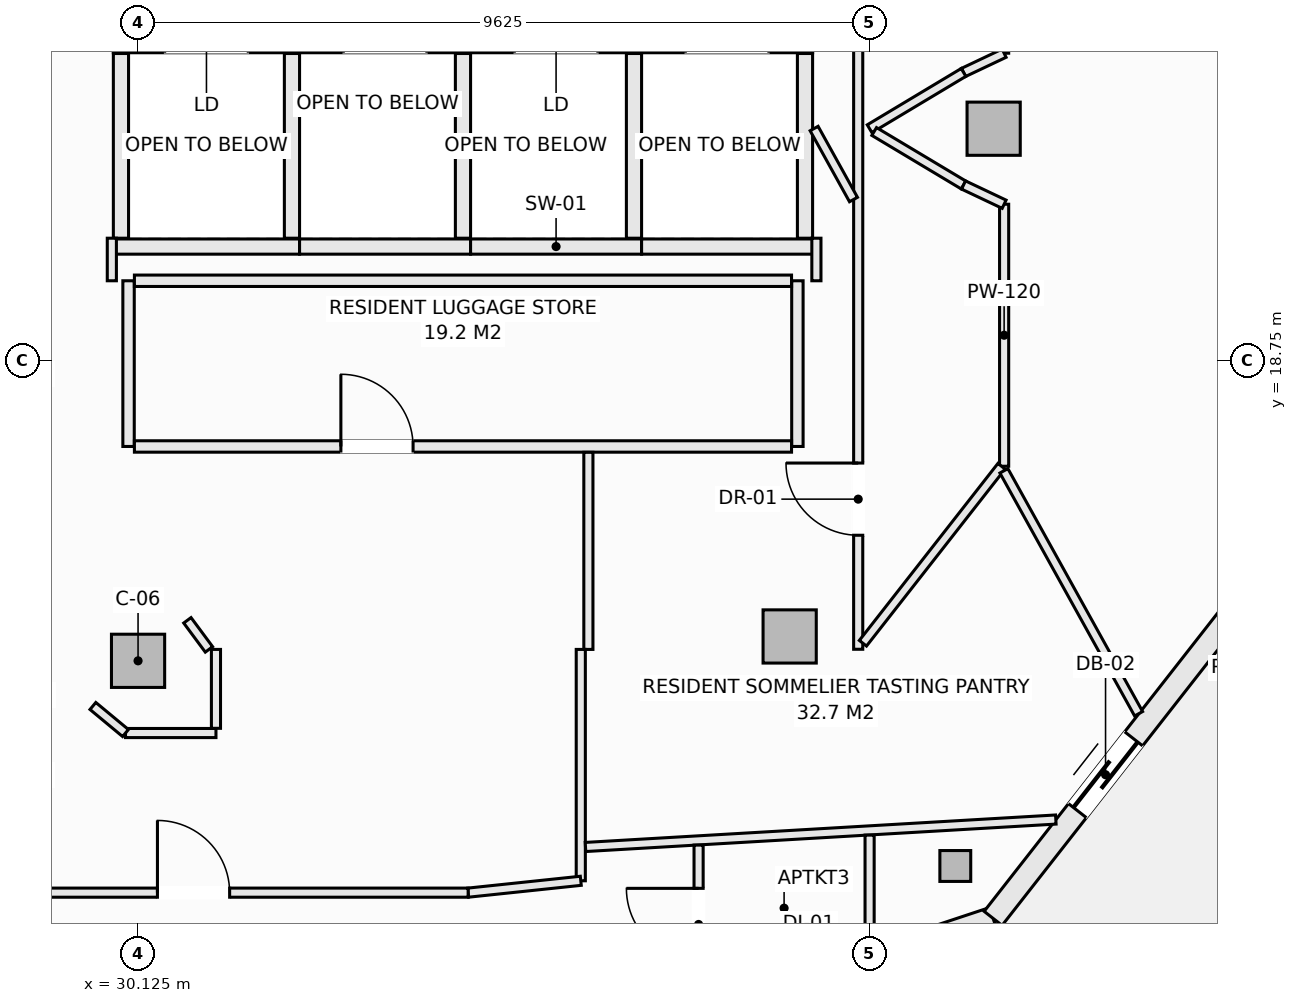
"""IFC4 building model, lengths in metres.
Left out: names, types, materials, properties, quantities, classifications, styles, units other than length and angle.
Written with IfcOpenShell. Run it as: python <this file> out.ifc"""

import sys

from ifc_helpers import new_model, si_unit, direction, frame, frame_2d, origin, origin_2d, place, context, subcontext, project, spatial, rectangle, hollow_rectangle, extrude, element, fill, save


model = new_model("IFC4")
c1 = context("Model", 3, precision=1e-05, world=origin(), true_north=direction((0.0, 1.0)))
c2 = subcontext(c1, "Body", "Model", "MODEL_VIEW")
j1 = project(units=[si_unit("LENGTHUNIT", "METRE"), si_unit("PLANEANGLEUNIT", "RADIAN")], contexts=[c1])
p1 = place(None, origin())
s1 = spatial("IfcSite", under=j1, at=p1, CompositionType="ELEMENT")
p2 = place(p1, origin())
s2 = spatial("IfcBuilding", under=s1, at=p2, CompositionType="ELEMENT")
p3 = place(p2, frame((0.0, 0.0, 245.9)))
s3 = spatial("IfcBuildingStorey", under=s2, at=p3, CompositionType="ELEMENT", Elevation=245.9)
p4 = place(p3, frame((40.878, 12.101, -0.27), z_axis=(0.0, 0.0, 1.0), x_axis=(1.0, 0.0, 0.0)))
e1 = element("IfcColumn", 1, at=p4, inside=s3, PredefinedType="COLUMN", context=c2, shape_type="SweptSolid", body=[
    extrude(hollow_rectangle(XDim=0.406, YDim=0.406, WallThickness=0.016, at=origin_2d()), origin(), (0.0, 0.0, 1.0), 3.3),
])
for number, where, z_axis, x_axis in (
    (2, (30.125, 14.8, -0.27), (0.0, 0.0, 1.0), (1.0, 0.0, 0.0)),
    (3, (38.698, 15.121, -0.27), (0.0, 0.0, 1.0), (1.0, 0.0, 0.0)),
    (4, (41.382, 21.801, -0.27), (0.0, 0.0, 1.0), (1.0, 0.0, 0.0)),
):
    element("IfcColumn", number, at=place(p3, frame(where, z_axis=z_axis, x_axis=x_axis)), inside=s3, PredefinedType="COLUMN", context=c2, shape_type="SweptSolid", body=[
        extrude(rectangle(XDim=0.7, YDim=0.7, at=origin_2d()), origin(), (0.0, 0.0, 1.0), 3.3),
    ])
p5 = place(p3, frame((35.948, 9.613, 0.0), z_axis=(0.0, 0.0, 1.0), x_axis=(0.949232769585, 0.314574552605, 0.0)))
e5 = element("IfcWall", 5, at=p5, inside=s3, PredefinedType="SOLIDWALL", context=c2, shape_type="SweptSolid", body=[
    extrude(rectangle(XDim=5.717, YDim=0.3, at=frame_2d((2.858, 0.0))), origin(), (0.0, 0.0, 1.0), 2.605),
])
p6 = place(p5, frame((2.64, 0.0, 0.72)))
e6 = element("IfcOpeningElement", 6, at=p6, cuts=e5, PredefinedType="OPENING", context=c2, shape_type="SweptSolid", body=[
    extrude(rectangle(XDim=1.2, YDim=1.65, at=frame_2d((0.6, 0.825))), frame((0.0, 0.16, 0.0), z_axis=(0.0, -1.0, 0.0), x_axis=(1.0, 0.0, 0.0)), (0.0, 0.0, 1.0), 0.32),
])
p7 = place(p3, frame((41.375, 11.412, 0.0), z_axis=(0.0, 0.0, 1.0), x_axis=(0.61644588519, 0.787397276241, 0.0)))
e7 = element("IfcWall", 7, at=p7, inside=s3, PredefinedType="SOLIDWALL", context=c2, shape_type="SweptSolid", body=[
    extrude(rectangle(XDim=5.357, YDim=0.3, at=frame_2d((2.678, 0.0))), origin(), (0.0, 0.0, 1.0), 2.605),
])
p8 = place(p7, frame((1.8, 0.0, 0.0)))
e8 = element("IfcOpeningElement", 8, at=p8, cuts=e7, PredefinedType="OPENING", context=c2, shape_type="SweptSolid", body=[
    extrude(rectangle(XDim=1.2, YDim=2.2, at=frame_2d((0.6, 1.1))), frame((0.0, 0.16, 0.0), z_axis=(0.0, -1.0, 0.0), x_axis=(1.0, 0.0, 0.0)), (0.0, 0.0, 1.0), 0.32),
])
p9 = place(p3, frame((43.323, 8.646, 0.0), z_axis=(0.0, 0.0, 1.0), x_axis=(0.63407318032, 0.77327304492, 0.0)))
e9 = element("IfcWall", 9, at=p9, inside=s3, PredefinedType="PARAPET", context=c2, shape_type="SweptSolid", body=[
    extrude(rectangle(XDim=6.379, YDim=0.22, at=frame_2d((3.189, 0.0))), origin(), (0.0, 0.0, 1.0), 0.52),
])
p10 = place(p3, frame((29.8, 22.9, 0.0), z_axis=(0.0, 0.0, 1.0), x_axis=(1.0, 0.0, 0.0)))
e10 = element("IfcWall", 10, at=p10, inside=s3, PredefinedType="SOLIDWALL", context=c2, shape_type="SweptSolid", body=[
    extrude(rectangle(XDim=2.45, YDim=0.2, at=frame_2d((1.225, 0.0))), origin(), (0.0, 0.0, 1.0), 3.03),
])
p11 = place(p10, frame((0.675, 0.0, 0.0)))
e11 = element("IfcOpeningElement", 11, at=p11, cuts=e10, PredefinedType="OPENING", context=c2, shape_type="SweptSolid", body=[
    extrude(rectangle(XDim=1.1, YDim=2.2, at=frame_2d((0.55, 1.1))), frame((0.0, 0.11, 0.0), z_axis=(0.0, -1.0, 0.0), x_axis=(1.0, 0.0, 0.0)), (0.0, 0.0, 1.0), 0.22),
])
p12 = place(p3, frame((29.8, 20.25, 0.0), z_axis=(0.0, 0.0, 1.0), x_axis=(1.0, 0.0, 0.0)))
e12 = element("IfcWall", 12, at=p12, inside=s3, PredefinedType="SOLIDWALL", context=c2, shape_type="SweptSolid", body=[
    extrude(rectangle(XDim=2.45, YDim=0.2, at=frame_2d((1.225, 0.0))), origin(), (0.0, 0.0, 1.0), 3.03),
])
for number, where, z_axis, x_axis in (
    (13, (29.9, 20.36, 0.0), (0.0, 0.0, 1.0), (0.0, 1.0, 0.0)),
    (14, (32.15, 20.36, 0.0), (0.0, 0.0, 1.0), (0.0, 1.0, 0.0)),
):
    element("IfcWall", number, at=place(p3, frame(where, z_axis=z_axis, x_axis=x_axis)), inside=s3, PredefinedType="SOLIDWALL", context=c2, shape_type="SweptSolid", body=[
        extrude(rectangle(XDim=2.43, YDim=0.2, at=frame_2d((1.215, 0.0))), origin(), (0.0, 0.0, 1.0), 3.03),
    ])
p13 = place(p3, frame((32.25, 22.9, 0.0), z_axis=(0.0, 0.0, 1.0), x_axis=(1.0, 0.0, 0.0)))
e15 = element("IfcWall", 15, at=p13, inside=s3, PredefinedType="SOLIDWALL", context=c2, shape_type="SweptSolid", body=[
    extrude(rectangle(XDim=2.25, YDim=0.2, at=frame_2d((1.125, 0.0))), origin(), (0.0, 0.0, 1.0), 3.03),
])
p14 = place(p13, frame((0.575, 0.0, 0.0)))
e16 = element("IfcOpeningElement", 16, at=p14, cuts=e15, PredefinedType="OPENING", context=c2, shape_type="SweptSolid", body=[
    extrude(rectangle(XDim=1.1, YDim=2.2, at=frame_2d((0.55, 1.1))), frame((0.0, 0.11, 0.0), z_axis=(0.0, -1.0, 0.0), x_axis=(1.0, 0.0, 0.0)), (0.0, 0.0, 1.0), 0.22),
])
p15 = place(p3, frame((32.25, 20.25, 0.0), z_axis=(0.0, 0.0, 1.0), x_axis=(1.0, 0.0, 0.0)))
e17 = element("IfcWall", 17, at=p15, inside=s3, PredefinedType="SOLIDWALL", context=c2, shape_type="SweptSolid", body=[
    extrude(rectangle(XDim=2.25, YDim=0.2, at=frame_2d((1.125, 0.0))), origin(), (0.0, 0.0, 1.0), 3.03),
])
p16 = place(p3, frame((34.4, 20.36, 0.0), z_axis=(0.0, 0.0, 1.0), x_axis=(0.0, 1.0, 0.0)))
e18 = element("IfcWall", 18, at=p16, inside=s3, PredefinedType="SOLIDWALL", context=c2, shape_type="SweptSolid", body=[
    extrude(rectangle(XDim=2.43, YDim=0.2, at=frame_2d((1.215, 0.0))), origin(), (0.0, 0.0, 1.0), 3.03),
])
p17 = place(p3, frame((34.5, 22.9, 0.0), z_axis=(0.0, 0.0, 1.0), x_axis=(1.0, 0.0, 0.0)))
e19 = element("IfcWall", 19, at=p17, inside=s3, PredefinedType="SOLIDWALL", context=c2, shape_type="SweptSolid", body=[
    extrude(rectangle(XDim=2.25, YDim=0.2, at=frame_2d((1.125, 0.0))), origin(), (0.0, 0.0, 1.0), 3.03),
])
p18 = place(p17, frame((0.575, 0.0, 0.0)))
e20 = element("IfcOpeningElement", 20, at=p18, cuts=e19, PredefinedType="OPENING", context=c2, shape_type="SweptSolid", body=[
    extrude(rectangle(XDim=1.1, YDim=2.2, at=frame_2d((0.55, 1.1))), frame((0.0, 0.11, 0.0), z_axis=(0.0, -1.0, 0.0), x_axis=(1.0, 0.0, 0.0)), (0.0, 0.0, 1.0), 0.22),
])
p19 = place(p3, frame((34.5, 20.25, 0.0), z_axis=(0.0, 0.0, 1.0), x_axis=(1.0, 0.0, 0.0)))
e21 = element("IfcWall", 21, at=p19, inside=s3, PredefinedType="SOLIDWALL", context=c2, shape_type="SweptSolid", body=[
    extrude(rectangle(XDim=2.25, YDim=0.2, at=frame_2d((1.125, 0.0))), origin(), (0.0, 0.0, 1.0), 3.03),
])
p20 = place(p3, frame((36.65, 20.36, 0.0), z_axis=(0.0, 0.0, 1.0), x_axis=(0.0, 1.0, 0.0)))
e22 = element("IfcWall", 22, at=p20, inside=s3, PredefinedType="SOLIDWALL", context=c2, shape_type="SweptSolid", body=[
    extrude(rectangle(XDim=2.43, YDim=0.2, at=frame_2d((1.215, 0.0))), origin(), (0.0, 0.0, 1.0), 3.03),
])
p21 = place(p3, frame((36.75, 22.9, 0.0), z_axis=(0.0, 0.0, 1.0), x_axis=(1.0, 0.0, 0.0)))
e23 = element("IfcWall", 23, at=p21, inside=s3, PredefinedType="SOLIDWALL", context=c2, shape_type="SweptSolid", body=[
    extrude(rectangle(XDim=2.25, YDim=0.2, at=frame_2d((1.125, 0.0))), origin(), (0.0, 0.0, 1.0), 3.03),
])
p22 = place(p21, frame((0.575, 0.0, 0.0)))
e24 = element("IfcOpeningElement", 24, at=p22, cuts=e23, PredefinedType="OPENING", context=c2, shape_type="SweptSolid", body=[
    extrude(rectangle(XDim=1.1, YDim=2.2, at=frame_2d((0.55, 1.1))), frame((0.0, 0.11, 0.0), z_axis=(0.0, -1.0, 0.0), x_axis=(1.0, 0.0, 0.0)), (0.0, 0.0, 1.0), 0.22),
])
p23 = place(p3, frame((36.75, 20.25, 0.0), z_axis=(0.0, 0.0, 1.0), x_axis=(1.0, 0.0, 0.0)))
e25 = element("IfcWall", 25, at=p23, inside=s3, PredefinedType="SOLIDWALL", context=c2, shape_type="SweptSolid", body=[
    extrude(rectangle(XDim=2.25, YDim=0.2, at=frame_2d((1.125, 0.0))), origin(), (0.0, 0.0, 1.0), 3.03),
])
p24 = place(p3, frame((38.9, 20.36, 0.0), z_axis=(0.0, 0.0, 1.0), x_axis=(0.0, 1.0, 0.0)))
e26 = element("IfcWall", 26, at=p24, inside=s3, PredefinedType="SOLIDWALL", context=c2, shape_type="SweptSolid", body=[
    extrude(rectangle(XDim=2.43, YDim=0.2, at=frame_2d((1.215, 0.0))), origin(), (0.0, 0.0, 1.0), 3.03),
])
for number, where, z_axis, x_axis in (
    (27, (30.0, 17.62, 0.0), (0.0, 0.0, 1.0), (0.0, 1.0, 0.0)),
    (28, (38.8, 17.62, 0.0), (0.0, 0.0, 1.0), (0.0, 1.0, 0.0)),
):
    element("IfcWall", number, at=place(p3, frame(where, z_axis=z_axis, x_axis=x_axis)), inside=s3, PredefinedType="PARTITIONING", context=c2, shape_type="SweptSolid", body=[
        extrude(rectangle(XDim=2.18, YDim=0.15, at=frame_2d((1.09, 0.0))), origin(), (0.0, 0.0, 1.0), 3.03),
    ])
p25 = place(p3, frame((30.077, 17.62, 0.0), z_axis=(0.0, 0.0, 1.0), x_axis=(1.0, 0.0, 0.0)))
e29 = element("IfcWall", 29, at=p25, inside=s3, PredefinedType="PARTITIONING", context=c2, shape_type="SweptSolid", body=[
    extrude(rectangle(XDim=8.646, YDim=0.15, at=frame_2d((4.323, 0.0))), origin(), (0.0, 0.0, 1.0), 3.03),
])
p26 = place(p25, frame((2.717, 0.0, 0.0)))
e30 = element("IfcOpeningElement", 30, at=p26, cuts=e29, PredefinedType="OPENING", context=c2, shape_type="SweptSolid", body=[
    extrude(rectangle(XDim=0.95, YDim=2.1, at=frame_2d((0.475, 1.05))), frame((0.0, 0.085, 0.0), z_axis=(0.0, -1.0, 0.0), x_axis=(1.0, 0.0, 0.0)), (0.0, 0.0, 1.0), 0.17),
])
p27 = place(p3, frame((30.077, 19.8, 0.0), z_axis=(0.0, 0.0, 1.0), x_axis=(1.0, 0.0, 0.0)))
e31 = element("IfcWall", 31, at=p27, inside=s3, PredefinedType="PARTITIONING", context=c2, shape_type="SweptSolid", body=[
    extrude(rectangle(XDim=8.646, YDim=0.15, at=frame_2d((4.323, 0.0))), origin(), (0.0, 0.0, 1.0), 3.03),
])
p28 = place(p3, frame((39.05, 19.8, 0.0), z_axis=(0.0, 0.0, 1.0), x_axis=(0.0, 1.0, 0.0)))
e32 = element("IfcWall", 32, at=p28, inside=s3, PredefinedType="PARTITIONING", context=c2, shape_type="SweptSolid", body=[
    extrude(rectangle(XDim=0.56, YDim=0.12, at=frame_2d((0.28, 0.0))), origin(), (0.0, 0.0, 1.0), 3.03),
])
p29 = place(p3, frame((39.6, 14.952, 0.0), z_axis=(0.0, 0.0, 1.0), x_axis=(0.0, 1.0, 0.0)))
e33 = element("IfcWall", 33, at=p29, inside=s3, PredefinedType="PARTITIONING", context=c2, shape_type="SweptSolid", body=[
    extrude(rectangle(XDim=8.068, YDim=0.12, at=frame_2d((4.034, 0.0))), origin(), (0.0, 0.0, 1.0), 2.478),
])
p30 = place(p29, frame((1.5, 0.0, 0.0)))
e34 = element("IfcOpeningElement", 34, at=p30, cuts=e33, PredefinedType="OPENING", context=c2, shape_type="SweptSolid", body=[
    extrude(rectangle(XDim=0.95, YDim=2.1, at=frame_2d((0.475, 1.05))), frame((0.0, 0.07, 0.0), z_axis=(0.0, -1.0, 0.0), x_axis=(1.0, 0.0, 0.0)), (0.0, 0.0, 1.0), 0.14),
])
p31 = place(p3, frame((41.52, 17.36, 0.0), z_axis=(0.0, 0.0, 1.0), x_axis=(0.0, 1.0, 0.0)))
e35 = element("IfcWall", 35, at=p31, inside=s3, PredefinedType="PARTITIONING", context=c2, shape_type="SweptSolid", body=[
    extrude(rectangle(XDim=3.447, YDim=0.12, at=frame_2d((1.723, 0.0))), origin(), (0.0, 0.0, 1.0), 3.03),
])
p32 = place(p3, frame((41.52, 22.794, 0.0), z_axis=(0.0, 0.0, 1.0), x_axis=(0.0, 1.0, 0.0)))
e36 = element("IfcWall", 36, at=p32, inside=s3, PredefinedType="PARTITIONING", context=c2, shape_type="SweptSolid", body=[
    extrude(rectangle(XDim=8.412, YDim=0.12, at=frame_2d((4.206, 0.0))), origin(), (0.0, 0.0, 1.0), 2.478),
])
p33 = place(p32, frame((1.999, 0.0, 0.0)))
e37 = element("IfcOpeningElement", 37, at=p33, cuts=e36, PredefinedType="OPENING", context=c2, shape_type="SweptSolid", body=[
    extrude(rectangle(XDim=0.95, YDim=2.1, at=frame_2d((0.475, 1.05))), frame((0.0, 0.07, 0.0), z_axis=(0.0, -1.0, 0.0), x_axis=(1.0, 0.0, 0.0)), (0.0, 0.0, 1.0), 0.14),
])
p34 = place(p3, frame((40.986, 22.541, 0.0), z_axis=(0.0, 0.0, 1.0), x_axis=(0.903729424576, 0.428104107847, 0.0)))
e38 = element("IfcWall", 38, at=p34, inside=s3, PredefinedType="PARTITIONING", context=c2, shape_type="SweptSolid", body=[
    extrude(rectangle(XDim=0.591, YDim=0.12, at=frame_2d((0.295, 0.0))), origin(), (0.0, 0.0, 1.0), 3.03),
])
p35 = place(p3, frame((39.75, 21.8, 0.0), z_axis=(0.0, 0.0, 1.0), x_axis=(0.857702120906, 0.514146935996, 0.0)))
e39 = element("IfcWall", 39, at=p35, inside=s3, PredefinedType="PARTITIONING", context=c2, shape_type="SweptSolid", body=[
    extrude(rectangle(XDim=1.441, YDim=0.12, at=frame_2d((0.721, 0.0))), origin(), (0.0, 0.0, 1.0), 3.03),
])
p36 = place(p3, frame((39.81, 21.764, 0.0), z_axis=(0.0, 0.0, 1.0), x_axis=(0.858011245414, -0.513630901273, 0.0)))
e40 = element("IfcWall", 40, at=p36, inside=s3, PredefinedType="PARTITIONING", context=c2, shape_type="SweptSolid", body=[
    extrude(rectangle(XDim=1.37, YDim=0.12, at=frame_2d((0.685, 0.0))), origin(), (0.0, 0.0, 1.0), 3.03),
])
p37 = place(p3, frame((40.986, 21.06, 0.0), z_axis=(0.0, 0.0, 1.0), x_axis=(0.90356951601, -0.428441512621, 0.0)))
e41 = element("IfcWall", 41, at=p37, inside=s3, PredefinedType="PARTITIONING", context=c2, shape_type="SweptSolid", body=[
    extrude(rectangle(XDim=0.591, YDim=0.12, at=frame_2d((0.295, 0.0))), origin(), (0.0, 0.0, 1.0), 3.03),
])
p38 = place(p3, frame((39.662, 15.031, 0.0), z_axis=(0.0, 0.0, 1.0), x_axis=(0.616497420092, 0.787356927334, 0.0)))
e42 = element("IfcWall", 42, at=p38, inside=s3, PredefinedType="PARTITIONING", context=c2, shape_type="SweptSolid", body=[
    extrude(rectangle(XDim=2.958, YDim=0.12, at=frame_2d((1.479, 0.0))), origin(), (0.0, 0.0, 1.0), 3.03),
])
p39 = place(p3, frame((29.78, 19.8, 0.0), z_axis=(0.0, 0.0, 1.0), x_axis=(0.0, 1.0, 0.0)))
e43 = element("IfcWall", 43, at=p39, inside=s3, PredefinedType="PARTITIONING", context=c2, shape_type="SweptSolid", body=[
    extrude(rectangle(XDim=0.56, YDim=0.12, at=frame_2d((0.28, 0.0))), origin(), (0.0, 0.0, 1.0), 3.03),
])
p40 = place(p3, frame((36.05, 14.95, 0.0), z_axis=(0.0, 0.0, 1.0), x_axis=(0.0, 1.0, 0.0)))
e44 = element("IfcWall", 44, at=p40, inside=s3, PredefinedType="PARTITIONING", context=c2, shape_type="SweptSolid", body=[
    extrude(rectangle(XDim=2.593, YDim=0.12, at=frame_2d((1.296, 0.0))), origin(), (0.0, 0.0, 1.0), 3.03),
])
p41 = place(p3, frame((35.95, 11.906, 0.0), z_axis=(0.0, 0.0, 1.0), x_axis=(0.0, 1.0, 0.0)))
e45 = element("IfcWall", 45, at=p41, inside=s3, PredefinedType="PARTITIONING", context=c2, shape_type="SweptSolid", body=[
    extrude(rectangle(XDim=3.044, YDim=0.12, at=frame_2d((1.522, 0.0))), origin(), (0.0, 0.0, 1.0), 3.03),
])
p42 = place(p3, frame((34.468, 11.75, 0.0), z_axis=(0.0, 0.0, 1.0), x_axis=(0.994504555135, 0.104693313135, 0.0)))
e46 = element("IfcWall", 46, at=p42, inside=s3, PredefinedType="PARTITIONING", context=c2, shape_type="SweptSolid", body=[
    extrude(rectangle(XDim=1.49, YDim=0.12, at=frame_2d((0.745, 0.0))), origin(), (0.0, 0.0, 1.0), 3.03),
])
p43 = place(p3, frame((27.242, 11.75, 0.0), z_axis=(0.0, 0.0, 1.0), x_axis=(1.0, 0.0, 0.0)))
e47 = element("IfcWall", 47, at=p43, inside=s3, PredefinedType="PARTITIONING", context=c2, shape_type="SweptSolid", body=[
    extrude(rectangle(XDim=7.226, YDim=0.12, at=frame_2d((3.613, 0.0))), origin(), (0.0, 0.0, 1.0), 3.03),
])
p44 = place(p43, frame((3.138, 0.0, 0.0)))
e48 = element("IfcOpeningElement", 48, at=p44, cuts=e47, PredefinedType="OPENING", context=c2, shape_type="SweptSolid", body=[
    extrude(rectangle(XDim=0.95, YDim=2.1, at=frame_2d((0.475, 1.05))), frame((0.0, 0.07, 0.0), z_axis=(0.0, -1.0, 0.0), x_axis=(1.0, 0.0, 0.0)), (0.0, 0.0, 1.0), 0.14),
])
p45 = place(p3, frame((29.96, 13.85, 0.0), z_axis=(0.0, 0.0, 1.0), x_axis=(1.0, 0.0, 0.0)))
e49 = element("IfcWall", 49, at=p45, inside=s3, PredefinedType="PARTITIONING", context=c2, shape_type="SweptSolid", body=[
    extrude(rectangle(XDim=1.19, YDim=0.12, at=frame_2d((0.595, 0.0))), origin(), (0.0, 0.0, 1.0), 3.03),
])
p46 = place(p3, frame((31.15, 13.912, 0.0), z_axis=(0.0, 0.0, 1.0), x_axis=(0.0, 1.0, 0.0)))
e50 = element("IfcWall", 50, at=p46, inside=s3, PredefinedType="PARTITIONING", context=c2, shape_type="SweptSolid", body=[
    extrude(rectangle(XDim=1.038, YDim=0.12, at=frame_2d((0.519, 0.0))), origin(), (0.0, 0.0, 1.0), 3.03),
])
p47 = place(p3, frame((30.774, 15.333, 0.0), z_axis=(0.0, 0.0, 1.0), x_axis=(0.595814974861, -0.803121731577, 0.0)))
e51 = element("IfcWall", 51, at=p47, inside=s3, PredefinedType="PARTITIONING", context=c2, shape_type="SweptSolid", body=[
    extrude(rectangle(XDim=0.477, YDim=0.12, at=frame_2d((0.239, 0.0))), origin(), (0.0, 0.0, 1.0), 3.03),
])
p48 = place(p3, frame((29.531, 14.206, 0.0), z_axis=(0.0, 0.0, 1.0), x_axis=(0.7695479554, -0.638589026166, 0.0)))
e52 = element("IfcWall", 52, at=p48, inside=s3, PredefinedType="PARTITIONING", context=c2, shape_type="SweptSolid", body=[
    extrude(rectangle(XDim=0.557, YDim=0.12, at=frame_2d((0.279, 0.0))), origin(), (0.0, 0.0, 1.0), 3.03),
])
p49 = place(p3, frame((36.012, 12.351, 0.0), z_axis=(0.0, 0.0, 1.0), x_axis=(0.998301967663, 0.058251020246, 0.0)))
e53 = element("IfcWall", 53, at=p49, inside=s3, PredefinedType="PARTITIONING", context=c2, shape_type="SweptSolid", body=[
    extrude(rectangle(XDim=6.199, YDim=0.12, at=frame_2d((3.099, 0.0))), origin(), (0.0, 0.0, 1.0), 2.605),
])
p50 = place(p3, frame((37.5, 10.288, 0.0), z_axis=(0.0, 0.0, 1.0), x_axis=(0.0, 1.0, 0.0)))
e54 = element("IfcWall", 54, at=p50, inside=s3, PredefinedType="PARTITIONING", context=c2, shape_type="SweptSolid", body=[
    extrude(rectangle(XDim=2.088, YDim=0.12, at=frame_2d((1.044, 0.0))), origin(), (0.0, 0.0, 1.0), 3.03),
])
p51 = place(p50, frame((0.569, 0.0, 0.0)))
e55 = element("IfcOpeningElement", 55, at=p51, cuts=e54, PredefinedType="OPENING", context=c2, shape_type="SweptSolid", body=[
    extrude(rectangle(XDim=0.95, YDim=2.1, at=frame_2d((0.475, 1.05))), frame((0.0, 0.07, 0.0), z_axis=(0.0, -1.0, 0.0), x_axis=(1.0, 0.0, 0.0)), (0.0, 0.0, 1.0), 0.14),
])
p52 = place(p3, frame((39.75, 11.033, 0.0), z_axis=(0.0, 0.0, 1.0), x_axis=(0.0, 1.0, 0.0)))
e56 = element("IfcWall", 56, at=p52, inside=s3, PredefinedType="PARTITIONING", context=c2, shape_type="SweptSolid", body=[
    extrude(rectangle(XDim=1.474, YDim=0.12, at=frame_2d((0.737, 0.0))), origin(), (0.0, 0.0, 1.0), 3.03),
])
p53 = place(p3, frame((39.02, 21.803, 0.0), z_axis=(0.0, 0.0, 1.0), x_axis=(0.485021793049, -0.874502064187, 0.0)))
e57 = element("IfcWall", 57, at=p53, inside=s3, PredefinedType="PARTITIONING", context=c2, shape_type="SweptSolid", body=[
    extrude(rectangle(XDim=1.068, YDim=0.12, at=frame_2d((0.534, 0.0))), origin(), (0.0, 0.0, 1.0), 3.03),
])
p54 = place(p3, frame((41.517, 17.3, 0.0), z_axis=(0.0, 0.0, 1.0), x_axis=(0.484911097078, -0.874563449917, 0.0)))
e58 = element("IfcWall", 58, at=p54, inside=s3, PredefinedType="PARTITIONING", context=c2, shape_type="SweptSolid", body=[
    extrude(rectangle(XDim=3.655, YDim=0.12, at=frame_2d((1.827, 0.0))), origin(), (0.0, 0.0, 1.0), 2.77),
])
p55 = place(p8, frame((1.2, 0.0, 0.0), z_axis=(0.0, 0.0, 1.0), x_axis=(-1.0, 0.0, 0.0)))
e59 = element("IfcDoor", 59, at=p55, inside=s3, OperationType="SLIDING_TO_LEFT", PredefinedType="DOOR", context=c2, shape_type="SweptSolid", body=[
    extrude(rectangle(XDim=1.2, YDim=2.2, at=frame_2d((0.6, 1.1))), frame((0.0, 0.025, 0.0), z_axis=(0.0, -1.0, 0.0), x_axis=(1.0, 0.0, 0.0)), (0.0, 0.0, 1.0), 0.05),
])
fill(e8, e59)
p56 = place(p26, origin())
e60 = element("IfcDoor", 60, at=p56, inside=s3, OperationType="SINGLE_SWING_LEFT", PredefinedType="DOOR", context=c2, shape_type="SweptSolid", body=[
    extrude(rectangle(XDim=0.95, YDim=2.1, at=frame_2d((0.475, 1.05))), frame((0.0, 0.025, 0.0), z_axis=(0.0, -1.0, 0.0), x_axis=(1.0, 0.0, 0.0)), (0.0, 0.0, 1.0), 0.05),
])
fill(e30, e60)
p57 = place(p44, origin())
e61 = element("IfcDoor", 61, at=p57, inside=s3, OperationType="SINGLE_SWING_LEFT", PredefinedType="DOOR", context=c2, shape_type="SweptSolid", body=[
    extrude(rectangle(XDim=0.95, YDim=2.1, at=frame_2d((0.475, 1.05))), frame((0.0, 0.025, 0.0), z_axis=(0.0, -1.0, 0.0), x_axis=(1.0, 0.0, 0.0)), (0.0, 0.0, 1.0), 0.05),
])
fill(e48, e61)
p58 = place(p30, origin())
e62 = element("IfcDoor", 62, at=p58, inside=s3, OperationType="SINGLE_SWING_RIGHT", PredefinedType="DOOR", context=c2, shape_type="SweptSolid", body=[
    extrude(rectangle(XDim=0.95, YDim=2.1, at=frame_2d((0.475, 1.05))), frame((0.0, 0.025, 0.0), z_axis=(0.0, -1.0, 0.0), x_axis=(1.0, 0.0, 0.0)), (0.0, 0.0, 1.0), 0.05),
])
fill(e34, e62)
p59 = place(p51, origin())
e63 = element("IfcDoor", 63, at=p59, inside=s3, OperationType="SINGLE_SWING_RIGHT", PredefinedType="DOOR", context=c2, shape_type="SweptSolid", body=[
    extrude(rectangle(XDim=0.95, YDim=2.1, at=frame_2d((0.475, 1.05))), frame((0.0, 0.025, 0.0), z_axis=(0.0, -1.0, 0.0), x_axis=(1.0, 0.0, 0.0)), (0.0, 0.0, 1.0), 0.05),
])
fill(e55, e63)
save(model, sys.argv[1])
